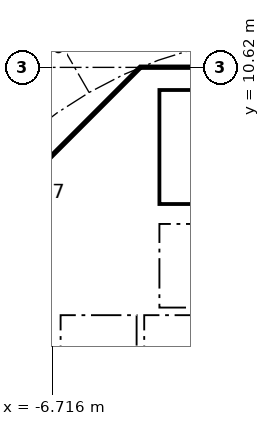
"""IFC4 building model, lengths in metres.
Left out: names, types, materials, properties, quantities, classifications, styles, units other than length and angle.
Written with IfcOpenShell. Run it as: python <this file> out.ifc"""

import sys

from ifc_helpers import new_model, si_unit, direction, frame, frame_2d, origin, place, context, subcontext, project, spatial, polyline, rectangle, outline, extrude, element, fill, save


model = new_model("IFC4")
c1 = context("Model", 3, precision=1e-05, world=origin(), true_north=direction((0.0, 1.0)))
c2 = subcontext(c1, "Body", "Model", "MODEL_VIEW")
j1 = project(units=[si_unit("LENGTHUNIT", "METRE"), si_unit("PLANEANGLEUNIT", "RADIAN")], contexts=[c1])
p1 = place(None, origin())
s1 = spatial("IfcSite", under=j1, at=p1, CompositionType="ELEMENT")
p2 = place(p1, origin())
s2 = spatial("IfcBuilding", under=s1, at=p2, CompositionType="ELEMENT")
p3 = place(p2, frame((0.0, 0.0, 27.0)))
s3 = spatial("IfcBuildingStorey", under=s2, at=p3, CompositionType="ELEMENT", Elevation=27.0)
p4 = place(p3, frame((-4.613, 9.988, 0.0), z_axis=(0.0, 0.0, 1.0), x_axis=(-0.707106781187, -0.707106781187, 0.0)))
e1 = element("IfcWall", 1, at=p4, inside=s3, PredefinedType="SHEAR", context=c2, shape_type="SweptSolid", body=[
    extrude(rectangle(XDim=7.602, YDim=0.6, at=frame_2d((3.801, 0.0))), origin(), (0.0, 0.0, 1.0), 3.44),
])
p5 = place(p4, frame((0.351, 0.0, 0.0)))
e2 = element("IfcOpeningElement", 2, at=p5, cuts=e1, PredefinedType="OPENING", context=c2, shape_type="SweptSolid", body=[
    extrude(rectangle(XDim=1.1, YDim=2.1, at=frame_2d((0.55, 1.05))), frame((0.0, 0.31, 0.0), z_axis=(0.0, -1.0, 0.0), x_axis=(1.0, 0.0, 0.0)), (0.0, 0.0, 1.0), 0.62),
])
p6 = place(p3, frame((-5.8, 4.3, 0.0), z_axis=(0.0, 0.0, 1.0), x_axis=(0.0, 1.0, 0.0)))
e3 = element("IfcWall", 3, at=p6, inside=s3, PredefinedType="PARTITIONING", context=c2, shape_type="SweptSolid", body=[
    extrude(rectangle(XDim=3.927, YDim=0.15, at=frame_2d((1.963, 0.0))), origin(), (0.0, 0.0, 1.0), 3.44),
])
p7 = place(p6, frame((0.413, 0.0, 0.0)))
e4 = element("IfcOpeningElement", 4, at=p7, cuts=e3, PredefinedType="OPENING", context=c2, shape_type="SweptSolid", body=[
    extrude(rectangle(XDim=0.9, YDim=2.1, at=frame_2d((0.45, 1.05))), frame((0.0, 0.085, 0.0), z_axis=(0.0, -1.0, 0.0), x_axis=(1.0, 0.0, 0.0)), (0.0, 0.0, 1.0), 0.17),
])
p8 = place(p6, frame((2.489, 0.0, 0.0)))
e5 = element("IfcOpeningElement", 5, at=p8, cuts=e3, PredefinedType="OPENING", context=c2, shape_type="SweptSolid", body=[
    extrude(rectangle(XDim=0.9, YDim=2.1, at=frame_2d((0.45, 1.05))), frame((0.0, 0.085, 0.0), z_axis=(0.0, -1.0, 0.0), x_axis=(1.0, 0.0, 0.0)), (0.0, 0.0, 1.0), 0.17),
])
p9 = place(p3, frame((-4.0, 4.3, 0.0), z_axis=(0.0, 0.0, 1.0), x_axis=(0.0, 1.0, 0.0)))
e6 = element("IfcWall", 6, at=p9, inside=s3, PredefinedType="SOLIDWALL", context=c2, shape_type="SweptSolid", body=[
    extrude(rectangle(XDim=2.2, YDim=0.2, at=frame_2d((1.1, 0.0))), origin(), (0.0, 0.0, 1.0), 3.44),
])
p10 = place(p9, frame((0.55, 0.0, 0.0)))
e7 = element("IfcOpeningElement", 7, at=p10, cuts=e6, PredefinedType="OPENING", context=c2, shape_type="SweptSolid", body=[
    extrude(rectangle(XDim=1.1, YDim=2.1, at=frame_2d((0.55, 1.05))), frame((0.0, 0.11, 0.0), z_axis=(0.0, -1.0, 0.0), x_axis=(1.0, 0.0, 0.0)), (0.0, 0.0, 1.0), 0.22),
])
p11 = place(p3, origin())
e8 = element("IfcWall", 8, at=p11, inside=s3, PredefinedType="SHEAR", context=c2, shape_type="SweptSolid", body=[
    extrude(outline(polyline([(-4.152, 10.025), (-4.401, 9.776), (-4.825, 10.2), (-4.401, 10.625), (4.401, 10.625), (4.825, 10.2), (4.401, 9.776), (4.152, 10.025), (-4.152, 10.025)])), origin(), (0.0, 0.0, 1.0), 3.44),
])
p12 = place(p3, frame((-10.025, 4.0, 0.0), z_axis=(0.0, 0.0, 1.0), x_axis=(1.0, 0.0, 0.0)))
e9 = element("IfcWall", 9, at=p12, inside=s3, PredefinedType="PARTITIONING", context=c2, shape_type="SweptSolid", body=[
    extrude(rectangle(XDim=3.325, YDim=0.2, at=frame_2d((1.662, 0.0))), origin(), (0.0, 0.0, 1.0), 3.44),
])
p13 = place(p3, frame((-8.001, 6.1, 0.0), z_axis=(0.0, 0.0, 1.0), x_axis=(1.0, 0.0, 0.0)))
e10 = element("IfcWall", 10, at=p13, inside=s3, PredefinedType="PARTITIONING", context=c2, shape_type="SweptSolid", body=[
    extrude(rectangle(XDim=2.126, YDim=0.15, at=frame_2d((1.063, 0.0))), origin(), (0.0, 0.0, 1.0), 3.44),
])
p14 = place(p3, origin())
e11 = element("IfcWall", 11, at=p14, inside=s3, PredefinedType="SOLIDWALL", context=c2, shape_type="SweptSolid", body=[
    extrude(outline(polyline([(-6.5, 2.1), (-6.7, 2.1), (-6.7, 4.3), (6.7, 4.3), (6.7, 2.1), (6.5, 2.1), (6.5, 4.1), (4.5, 4.1), (4.5, 2.1), (4.3, 2.1), (4.3, 4.1), (2.3, 4.1), (2.3, 2.1), (2.1, 2.1), (2.1, 4.1), (0.1, 4.1), (0.1, 2.1), (-0.1, 2.1), (-0.1, 4.1), (-2.1, 4.1), (-2.1, 2.1), (-2.3, 2.1), (-2.3, 4.1), (-4.3, 4.1), (-4.3, 2.1), (-4.5, 2.1), (-4.5, 4.1), (-6.5, 4.1), (-6.5, 2.1)])), origin(), (0.0, 0.0, 1.0), 3.44),
])
p15 = place(p3, origin())
e12 = element("IfcWall", 12, at=p15, inside=s3, PredefinedType="SOLIDWALL", context=c2, shape_type="SweptSolid", body=[
    extrude(outline(polyline([(-3.9, 7.025), (-4.1, 7.025), (-4.1, 10.025), (-3.9, 10.025), (-3.9, 7.025)])), origin(), (0.0, 0.0, 1.0), 3.44),
])
p16 = place(p3, origin())
e13 = element("IfcWall", 13, at=p16, inside=s3, PredefinedType="SOLIDWALL", context=c2, shape_type="SweptSolid", body=[
    extrude(outline(polyline([(4.1, 6.5), (-4.1, 6.5), (-4.1, 7.025), (4.1, 7.025), (4.1, 6.5)])), origin(), (0.0, 0.0, 1.0), 3.44),
])
p17 = place(p3, frame((-5.275, 12.494, 0.0), z_axis=(0.0, 0.0, 1.0), x_axis=(-0.707106781187, -0.707106781187, 0.0)))
e14 = element("IfcWall", 14, at=p17, inside=s3, PredefinedType="PARTITIONING", context=c2, shape_type="SweptSolid", body=[
    extrude(rectangle(XDim=10.209, YDim=0.2, at=frame_2d((5.104, 0.0))), origin(), (0.0, 0.0, 1.0), 3.44),
])
p18 = place(p10, origin())
e15 = element("IfcDoor", 15, at=p18, inside=s3, OperationType="DOUBLE_DOOR_SLIDING", PredefinedType="DOOR", context=c2, shape_type="SweptSolid", body=[
    extrude(rectangle(XDim=1.1, YDim=2.1, at=frame_2d((0.55, 1.05))), frame((0.0, 0.025, 0.0), z_axis=(0.0, -1.0, 0.0), x_axis=(1.0, 0.0, 0.0)), (0.0, 0.0, 1.0), 0.05),
])
fill(e7, e15)
p19 = place(p7, origin())
e16 = element("IfcDoor", 16, at=p19, inside=s3, OperationType="SINGLE_SWING_LEFT", PredefinedType="DOOR", context=c2, shape_type="SweptSolid", body=[
    extrude(rectangle(XDim=0.9, YDim=2.1, at=frame_2d((0.45, 1.05))), frame((0.0, 0.025, 0.0), z_axis=(0.0, -1.0, 0.0), x_axis=(1.0, 0.0, 0.0)), (0.0, 0.0, 1.0), 0.05),
])
fill(e4, e16)
p20 = place(p8, origin())
e17 = element("IfcDoor", 17, at=p20, inside=s3, OperationType="SINGLE_SWING_LEFT", PredefinedType="DOOR", context=c2, shape_type="SweptSolid", body=[
    extrude(rectangle(XDim=0.9, YDim=2.1, at=frame_2d((0.45, 1.05))), frame((0.0, 0.025, 0.0), z_axis=(0.0, -1.0, 0.0), x_axis=(1.0, 0.0, 0.0)), (0.0, 0.0, 1.0), 0.05),
])
fill(e5, e17)
p21 = place(p5, origin())
e18 = element("IfcDoor", 18, at=p21, inside=s3, OperationType="SINGLE_SWING_LEFT", PredefinedType="DOOR", context=c2, shape_type="SweptSolid", body=[
    extrude(rectangle(XDim=1.1, YDim=2.1, at=frame_2d((0.55, 1.05))), frame((0.0, 0.025, 0.0), z_axis=(0.0, -1.0, 0.0), x_axis=(1.0, 0.0, 0.0)), (0.0, 0.0, 1.0), 0.05),
])
fill(e2, e18)
save(model, sys.argv[1])
